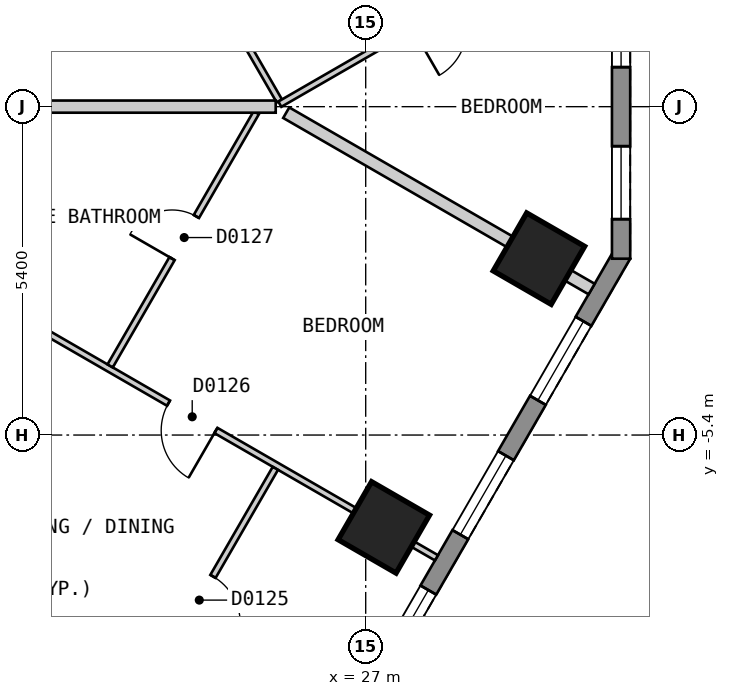
"""IFC4 building model, lengths in metres.
Left out: names, types, materials, properties, quantities, classifications, styles, units other than length and angle.
Written with IfcOpenShell. Run it as: python <this file> out.ifc"""

import sys

from ifc_helpers import new_model, si_unit, direction, frame, frame_2d, origin, origin_2d, place, context, subcontext, project, spatial, polyline, rectangle, outline, extrude, element, fill, save


model = new_model("IFC4")
c1 = context("Model", 3, precision=1e-05, world=origin(), true_north=direction((0.0, 1.0)))
c2 = subcontext(c1, "Body", "Model", "MODEL_VIEW")
j1 = project(units=[si_unit("LENGTHUNIT", "METRE"), si_unit("PLANEANGLEUNIT", "RADIAN")], contexts=[c1])
p1 = place(None, origin())
s1 = spatial("IfcSite", under=j1, at=p1, CompositionType="ELEMENT")
p2 = place(p1, origin())
s2 = spatial("IfcBuilding", under=s1, at=p2, CompositionType="ELEMENT")
p3 = place(p2, frame((0.0, 0.0, 29.4)))
s3 = spatial("IfcBuildingStorey", under=s2, at=p3, CompositionType="ELEMENT", Elevation=29.4)
for number, where, z_axis, x_axis in (
    (1, (27.298, -6.919, 0.0), (0.0, 0.0, 1.0), (0.5, 0.866, 0.0)),
    (2, (29.849, -2.499, 0.0), (0.0, 0.0, 1.0), (0.5, 0.866, 0.0)),
):
    element("IfcColumn", number, at=place(p3, frame(where, z_axis=z_axis, x_axis=x_axis)), inside=s3, PredefinedType="COLUMN", context=c2, shape_type="SweptSolid", body=[
        extrude(rectangle(XDim=1.1, YDim=1.1, at=origin_2d()), origin(), (0.0, 0.0, 1.0), 3.0),
    ])
p4 = place(p3, frame((17.71, -25.825, 0.0), z_axis=(0.0, 0.0, 1.0), x_axis=(0.500001938803, 0.866024284413, 0.0)))
e3 = element("IfcWall", 3, at=p4, inside=s3, PredefinedType="SOLIDWALL", context=c2, shape_type="SweptSolid", body=[
    extrude(outline(polyline([(0.0, -0.15), (27.02, -0.15), (26.94, 0.15), (0.08, 0.15), (0.0, -0.15)])), origin(), (0.0, 0.0, 1.0), 2.7),
])
p5 = place(p4, frame((1.277, 0.0, 0.15)))
e4 = element("IfcOpeningElement", 4, at=p5, cuts=e3, PredefinedType="OPENING", context=c2, shape_type="SweptSolid", body=[
    extrude(rectangle(XDim=1.5, YDim=2.1, at=frame_2d((0.75, 1.05))), frame((0.0, 0.16, 0.0), z_axis=(0.0, -1.0, 0.0), x_axis=(1.0, 0.0, 0.0)), (0.0, 0.0, 1.0), 0.32),
])
p6 = place(p4, frame((3.829, 0.0, 0.15)))
e5 = element("IfcOpeningElement", 5, at=p6, cuts=e3, PredefinedType="OPENING", context=c2, shape_type="SweptSolid", body=[
    extrude(rectangle(XDim=1.5, YDim=2.1, at=frame_2d((0.75, 1.05))), frame((0.0, 0.16, 0.0), z_axis=(0.0, -1.0, 0.0), x_axis=(1.0, 0.0, 0.0)), (0.0, 0.0, 1.0), 0.32),
])
p7 = place(p4, frame((6.382, 0.0, 0.15)))
e6 = element("IfcOpeningElement", 6, at=p7, cuts=e3, PredefinedType="OPENING", context=c2, shape_type="SweptSolid", body=[
    extrude(rectangle(XDim=1.5, YDim=2.1, at=frame_2d((0.75, 1.05))), frame((0.0, 0.16, 0.0), z_axis=(0.0, -1.0, 0.0), x_axis=(1.0, 0.0, 0.0)), (0.0, 0.0, 1.0), 0.32),
])
p8 = place(p4, frame((8.933, 0.0, 0.15)))
e7 = element("IfcOpeningElement", 7, at=p8, cuts=e3, PredefinedType="OPENING", context=c2, shape_type="SweptSolid", body=[
    extrude(rectangle(XDim=1.5, YDim=2.1, at=frame_2d((0.75, 1.05))), frame((0.0, 0.16, 0.0), z_axis=(0.0, -1.0, 0.0), x_axis=(1.0, 0.0, 0.0)), (0.0, 0.0, 1.0), 0.32),
])
p9 = place(p4, frame((11.485, 0.0, 0.15)))
e8 = element("IfcOpeningElement", 8, at=p9, cuts=e3, PredefinedType="OPENING", context=c2, shape_type="SweptSolid", body=[
    extrude(rectangle(XDim=1.5, YDim=2.1, at=frame_2d((0.75, 1.05))), frame((0.0, 0.16, 0.0), z_axis=(0.0, -1.0, 0.0), x_axis=(1.0, 0.0, 0.0)), (0.0, 0.0, 1.0), 0.32),
])
p10 = place(p4, frame((14.037, 0.0, 0.15)))
e9 = element("IfcOpeningElement", 9, at=p10, cuts=e3, PredefinedType="OPENING", context=c2, shape_type="SweptSolid", body=[
    extrude(rectangle(XDim=1.5, YDim=2.1, at=frame_2d((0.75, 1.05))), frame((0.0, 0.16, 0.0), z_axis=(0.0, -1.0, 0.0), x_axis=(1.0, 0.0, 0.0)), (0.0, 0.0, 1.0), 0.32),
])
p11 = place(p4, frame((16.589, 0.0, 0.15)))
e10 = element("IfcOpeningElement", 10, at=p11, cuts=e3, PredefinedType="OPENING", context=c2, shape_type="SweptSolid", body=[
    extrude(rectangle(XDim=1.5, YDim=2.1, at=frame_2d((0.75, 1.05))), frame((0.0, 0.16, 0.0), z_axis=(0.0, -1.0, 0.0), x_axis=(1.0, 0.0, 0.0)), (0.0, 0.0, 1.0), 0.32),
])
p12 = place(p4, frame((19.141, 0.0, 0.15)))
e11 = element("IfcOpeningElement", 11, at=p12, cuts=e3, PredefinedType="OPENING", context=c2, shape_type="SweptSolid", body=[
    extrude(rectangle(XDim=1.5, YDim=2.1, at=frame_2d((0.75, 1.05))), frame((0.0, 0.16, 0.0), z_axis=(0.0, -1.0, 0.0), x_axis=(1.0, 0.0, 0.0)), (0.0, 0.0, 1.0), 0.32),
])
p13 = place(p4, frame((21.693, 0.0, 0.15)))
e12 = element("IfcOpeningElement", 12, at=p13, cuts=e3, PredefinedType="OPENING", context=c2, shape_type="SweptSolid", body=[
    extrude(rectangle(XDim=1.5, YDim=2.1, at=frame_2d((0.75, 1.05))), frame((0.0, 0.16, 0.0), z_axis=(0.0, -1.0, 0.0), x_axis=(1.0, 0.0, 0.0)), (0.0, 0.0, 1.0), 0.32),
])
p14 = place(p4, frame((24.244, 0.0, 0.15)))
e13 = element("IfcOpeningElement", 13, at=p14, cuts=e3, PredefinedType="OPENING", context=c2, shape_type="SweptSolid", body=[
    extrude(rectangle(XDim=1.5, YDim=2.1, at=frame_2d((0.75, 1.05))), frame((0.0, 0.16, 0.0), z_axis=(0.0, -1.0, 0.0), x_axis=(1.0, 0.0, 0.0)), (0.0, 0.0, 1.0), 0.32),
])
p15 = place(p3, frame((31.2, -2.5, 0.0), z_axis=(0.0, 0.0, 1.0), x_axis=(0.0, 1.0, 0.0)))
e14 = element("IfcWall", 14, at=p15, inside=s3, PredefinedType="SOLIDWALL", context=c2, shape_type="SweptSolid", body=[
    extrude(outline(polyline([(0.0, -0.15), (5.0, -0.15), (4.92, 0.15), (0.08, 0.15), (0.0, -0.15)])), origin(), (0.0, 0.0, 1.0), 2.7),
])
p16 = place(p15, frame((0.65, 0.0, 0.15)))
e15 = element("IfcOpeningElement", 15, at=p16, cuts=e14, PredefinedType="OPENING", context=c2, shape_type="SweptSolid", body=[
    extrude(rectangle(XDim=1.2, YDim=2.1, at=frame_2d((0.6, 1.05))), frame((0.0, 0.16, 0.0), z_axis=(0.0, -1.0, 0.0), x_axis=(1.0, 0.0, 0.0)), (0.0, 0.0, 1.0), 0.32),
])
p17 = place(p15, frame((3.15, 0.0, 0.15)))
e16 = element("IfcOpeningElement", 16, at=p17, cuts=e14, PredefinedType="OPENING", context=c2, shape_type="SweptSolid", body=[
    extrude(rectangle(XDim=1.2, YDim=2.1, at=frame_2d((0.6, 1.05))), frame((0.0, 0.16, 0.0), z_axis=(0.0, -1.0, 0.0), x_axis=(1.0, 0.0, 0.0)), (0.0, 0.0, 1.0), 0.32),
])
p18 = place(p3, frame((20.551, 8.805, 0.0), z_axis=(0.0, 0.0, 1.0), x_axis=(0.499984387913, -0.86603441724, 0.0)))
e17 = element("IfcWall", 17, at=p18, inside=s3, PredefinedType="PARTITIONING", context=c2, shape_type="SweptSolid", body=[
    extrude(rectangle(XDim=10.058, YDim=0.1, at=frame_2d((5.029, 0.0))), origin(), (0.0, 0.0, 1.0), 2.7),
])
p19 = place(p18, frame((1.978, 0.0, 0.0)))
e18 = element("IfcOpeningElement", 18, at=p19, cuts=e17, PredefinedType="OPENING", context=c2, shape_type="SweptSolid", body=[
    extrude(rectangle(XDim=0.9, YDim=2.1, at=frame_2d((0.45, 1.05))), frame((0.0, 0.06, 0.0), z_axis=(0.0, -1.0, 0.0), x_axis=(1.0, 0.0, 0.0)), (0.0, 0.0, 1.0), 0.12),
])
p20 = place(p18, frame((7.157, 0.0, 0.0)))
e19 = element("IfcOpeningElement", 19, at=p20, cuts=e17, PredefinedType="OPENING", context=c2, shape_type="SweptSolid", body=[
    extrude(rectangle(XDim=0.8, YDim=2.1, at=frame_2d((0.4, 1.05))), frame((0.0, 0.06, 0.0), z_axis=(0.0, -1.0, 0.0), x_axis=(1.0, 0.0, 0.0)), (0.0, 0.0, 1.0), 0.12),
])
p21 = place(p3, frame((19.503, -2.419, 0.0), z_axis=(0.0, 0.0, 1.0), x_axis=(0.866047370643, -0.499961950354, 0.0)))
e20 = element("IfcWall", 20, at=p21, inside=s3, PredefinedType="PARTITIONING", context=c2, shape_type="SweptSolid", body=[
    extrude(rectangle(XDim=10.001, YDim=0.1, at=frame_2d((5.0, 0.0))), origin(), (0.0, 0.0, 1.0), 2.7),
])
p22 = place(p21, frame((4.912, 0.0, 0.0)))
e21 = element("IfcOpeningElement", 21, at=p22, cuts=e20, PredefinedType="OPENING", context=c2, shape_type="SweptSolid", body=[
    extrude(rectangle(XDim=0.9, YDim=2.1, at=frame_2d((0.45, 1.05))), frame((0.0, 0.06, 0.0), z_axis=(0.0, -1.0, 0.0), x_axis=(1.0, 0.0, 0.0)), (0.0, 0.0, 1.0), 0.12),
])
p23 = place(p3, frame((22.797, -4.263, 0.0), z_axis=(0.0, 0.0, 1.0), x_axis=(0.499820637322, 0.866128934112, 0.0)))
e22 = element("IfcWall", 22, at=p23, inside=s3, PredefinedType="PARTITIONING", context=c2, shape_type="SweptSolid", body=[
    extrude(rectangle(XDim=4.807, YDim=0.1, at=frame_2d((2.404, 0.0))), origin(), (0.0, 0.0, 1.0), 2.7),
])
p24 = place(p23, frame((2.037, 0.0, 0.0)))
e23 = element("IfcOpeningElement", 23, at=p24, cuts=e22, PredefinedType="OPENING", context=c2, shape_type="SweptSolid", body=[
    extrude(rectangle(XDim=0.8, YDim=2.1, at=frame_2d((0.4, 1.05))), frame((0.0, 0.06, 0.0), z_axis=(0.0, -1.0, 0.0), x_axis=(1.0, 0.0, 0.0)), (0.0, 0.0, 1.0), 0.12),
])
p25 = place(p3, frame((23.037, -10.238, 0.0), z_axis=(0.0, 0.0, 1.0), x_axis=(0.49999264683, 0.866029649098, 0.0)))
e24 = element("IfcWall", 24, at=p25, inside=s3, PredefinedType="PARTITIONING", context=c2, shape_type="SweptSolid", body=[
    extrude(rectangle(XDim=4.954, YDim=0.1, at=frame_2d((2.477, 0.0))), origin(), (0.0, 0.0, 1.0), 2.7),
])
p26 = place(p25, frame((2.002, 0.0, 0.0)))
e25 = element("IfcOpeningElement", 25, at=p26, cuts=e24, PredefinedType="OPENING", context=c2, shape_type="SweptSolid", body=[
    extrude(rectangle(XDim=0.9, YDim=2.1, at=frame_2d((0.45, 1.05))), frame((0.0, 0.06, 0.0), z_axis=(0.0, -1.0, 0.0), x_axis=(1.0, 0.0, 0.0)), (0.0, 0.0, 1.0), 0.12),
])
p27 = place(p3, frame((25.588, 0.041, 0.0), z_axis=(0.0, 0.0, 1.0), x_axis=(0.866113484451, 0.499847408768, 0.0)))
e26 = element("IfcWall", 26, at=p27, inside=s3, PredefinedType="PARTITIONING", context=c2, shape_type="SweptSolid", body=[
    extrude(rectangle(XDim=5.92, YDim=0.1, at=frame_2d((2.96, 0.0))), origin(), (0.0, 0.0, 1.0), 2.7),
])
p28 = place(p27, frame((2.51, 0.0, 0.0)))
e27 = element("IfcOpeningElement", 27, at=p28, cuts=e26, PredefinedType="OPENING", context=c2, shape_type="SweptSolid", body=[
    extrude(rectangle(XDim=0.9, YDim=2.1, at=frame_2d((0.45, 1.05))), frame((0.0, 0.06, 0.0), z_axis=(0.0, -1.0, 0.0), x_axis=(1.0, 0.0, 0.0)), (0.0, 0.0, 1.0), 0.12),
])
p29 = place(p3, frame((25.693, -0.099, 0.0), z_axis=(0.0, 0.0, 1.0), x_axis=(0.866032775405, -0.499987231761, 0.0)))
e28 = element("IfcWall", 28, at=p29, inside=s3, PredefinedType="PARTITIONING", context=c2, shape_type="SweptSolid", body=[
    extrude(rectangle(XDim=5.8, YDim=0.2, at=frame_2d((2.9, 0.0))), origin(), (0.0, 0.0, 1.0), 2.7),
])
p30 = place(p3, frame((16.916, -6.819, 0.0), z_axis=(0.0, 0.0, 1.0), x_axis=(0.866028876723, -0.499993984646, 0.0)))
e29 = element("IfcWall", 29, at=p30, inside=s3, PredefinedType="PARTITIONING", context=c2, shape_type="SweptSolid", body=[
    extrude(rectangle(XDim=10.04, YDim=0.2, at=frame_2d((5.02, 0.0))), origin(), (0.0, 0.0, 1.0), 2.7),
])
p31 = place(p3, frame((20.784, 0.001, 0.0), z_axis=(0.0, 0.0, 1.0), x_axis=(1.0, 0.0, 0.0)))
e30 = element("IfcWall", 30, at=p31, inside=s3, PredefinedType="PARTITIONING", context=c2, shape_type="SweptSolid", body=[
    extrude(rectangle(XDim=4.736, YDim=0.2, at=frame_2d((2.368, 0.0))), origin(), (0.0, 0.0, 1.0), 2.7),
])
p32 = place(p12, origin())
e31 = element("IfcWindow", 31, at=p32, inside=s3, PartitioningType="SINGLE_PANEL", PredefinedType="WINDOW", context=c2, shape_type="SweptSolid", body=[
    extrude(rectangle(XDim=1.5, YDim=2.1, at=frame_2d((0.75, 1.05))), frame((0.0, 0.03, 0.0), z_axis=(0.0, -1.0, 0.0), x_axis=(1.0, 0.0, 0.0)), (0.0, 0.0, 1.0), 0.06),
])
fill(e11, e31)
p33 = place(p13, origin())
e32 = element("IfcWindow", 32, at=p33, inside=s3, PartitioningType="SINGLE_PANEL", PredefinedType="WINDOW", context=c2, shape_type="SweptSolid", body=[
    extrude(rectangle(XDim=1.5, YDim=2.1, at=frame_2d((0.75, 1.05))), frame((0.0, 0.03, 0.0), z_axis=(0.0, -1.0, 0.0), x_axis=(1.0, 0.0, 0.0)), (0.0, 0.0, 1.0), 0.06),
])
fill(e12, e32)
p34 = place(p14, origin())
e33 = element("IfcWindow", 33, at=p34, inside=s3, PartitioningType="SINGLE_PANEL", PredefinedType="WINDOW", context=c2, shape_type="SweptSolid", body=[
    extrude(rectangle(XDim=1.5, YDim=2.1, at=frame_2d((0.75, 1.05))), frame((0.0, 0.03, 0.0), z_axis=(0.0, -1.0, 0.0), x_axis=(1.0, 0.0, 0.0)), (0.0, 0.0, 1.0), 0.06),
])
fill(e13, e33)
p35 = place(p16, origin())
e34 = element("IfcWindow", 34, at=p35, inside=s3, PartitioningType="SINGLE_PANEL", PredefinedType="WINDOW", context=c2, shape_type="SweptSolid", body=[
    extrude(rectangle(XDim=1.2, YDim=2.1, at=frame_2d((0.6, 1.05))), frame((0.0, 0.03, 0.0), z_axis=(0.0, -1.0, 0.0), x_axis=(1.0, 0.0, 0.0)), (0.0, 0.0, 1.0), 0.06),
])
fill(e15, e34)
p36 = place(p17, origin())
e35 = element("IfcWindow", 35, at=p36, inside=s3, PartitioningType="SINGLE_PANEL", PredefinedType="WINDOW", context=c2, shape_type="SweptSolid", body=[
    extrude(rectangle(XDim=1.2, YDim=2.1, at=frame_2d((0.6, 1.05))), frame((0.0, 0.03, 0.0), z_axis=(0.0, -1.0, 0.0), x_axis=(1.0, 0.0, 0.0)), (0.0, 0.0, 1.0), 0.06),
])
fill(e16, e35)
p37 = place(p26, origin())
e36 = element("IfcDoor", 36, at=p37, inside=s3, OperationType="SINGLE_SWING_LEFT", PredefinedType="DOOR", context=c2, shape_type="SweptSolid", body=[
    extrude(rectangle(XDim=0.9, YDim=2.1, at=frame_2d((0.45, 1.05))), frame((0.0, 0.025, 0.0), z_axis=(0.0, -1.0, 0.0), x_axis=(1.0, 0.0, 0.0)), (0.0, 0.0, 1.0), 0.05),
])
fill(e25, e36)
p38 = place(p22, origin())
e37 = element("IfcDoor", 37, at=p38, inside=s3, OperationType="SINGLE_SWING_RIGHT", PredefinedType="DOOR", context=c2, shape_type="SweptSolid", body=[
    extrude(rectangle(XDim=0.9, YDim=2.1, at=frame_2d((0.45, 1.05))), frame((0.0, 0.025, 0.0), z_axis=(0.0, -1.0, 0.0), x_axis=(1.0, 0.0, 0.0)), (0.0, 0.0, 1.0), 0.05),
])
fill(e21, e37)
p39 = place(p24, origin())
e38 = element("IfcDoor", 38, at=p39, inside=s3, OperationType="SINGLE_SWING_LEFT", PredefinedType="DOOR", context=c2, shape_type="SweptSolid", body=[
    extrude(rectangle(XDim=0.8, YDim=2.1, at=frame_2d((0.4, 1.05))), frame((0.0, 0.025, 0.0), z_axis=(0.0, -1.0, 0.0), x_axis=(1.0, 0.0, 0.0)), (0.0, 0.0, 1.0), 0.05),
])
fill(e23, e38)
save(model, sys.argv[1])
